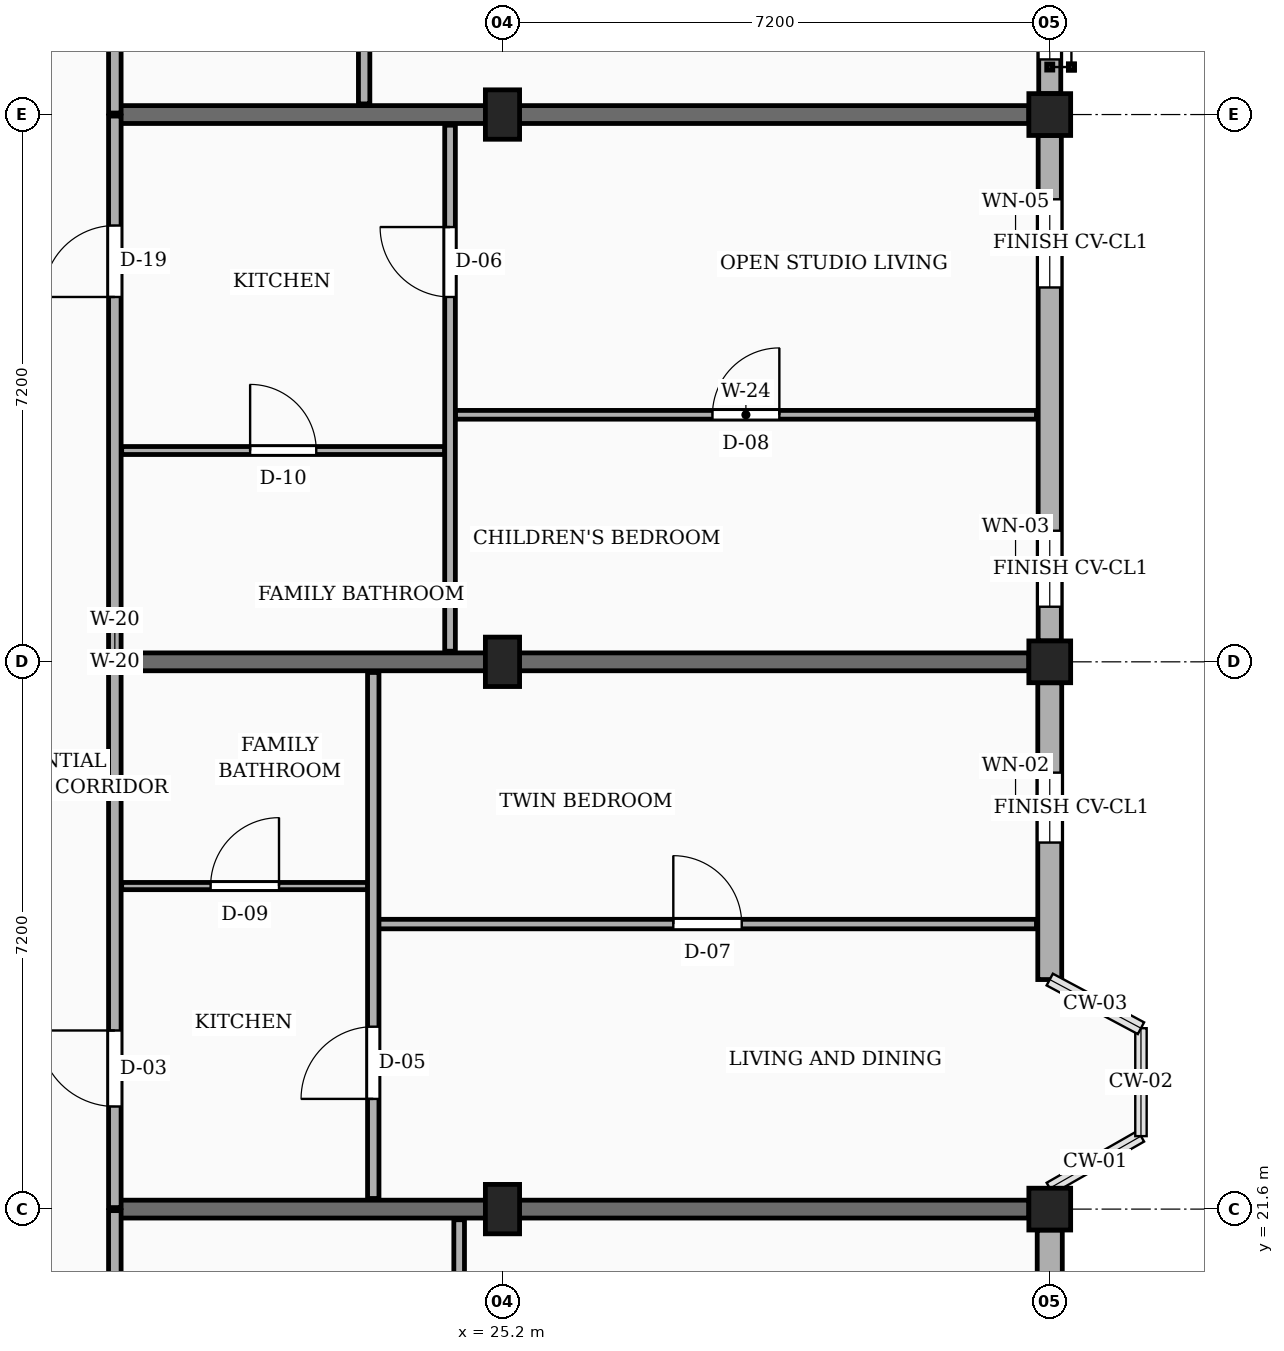
"""IFC4 building model, lengths in metres.
Left out: names, types, materials, properties, quantities, classifications, styles, units other than length and angle.
Written with IfcOpenShell. Run it as: python <this file> out.ifc"""

import sys

from ifc_helpers import new_model, si_unit, direction, frame, frame_2d, origin, origin_2d, place, context, subcontext, project, spatial, rectangle, extrude, element, fill, save


model = new_model("IFC4")
c1 = context("Model", 3, precision=1e-05, world=origin(), true_north=direction((0.0, 1.0)))
c2 = subcontext(c1, "Body", "Model", "MODEL_VIEW")
j1 = project(units=[si_unit("LENGTHUNIT", "METRE"), si_unit("PLANEANGLEUNIT", "RADIAN")], contexts=[c1])
p1 = place(None, origin())
s1 = spatial("IfcSite", under=j1, at=p1, CompositionType="ELEMENT")
p2 = place(p1, origin())
s2 = spatial("IfcBuilding", under=s1, at=p2, CompositionType="ELEMENT")
p3 = place(p2, frame((0.0, 0.0, 20.25)))
s3 = spatial("IfcBuildingStorey", under=s2, at=p3, CompositionType="ELEMENT", Elevation=20.25)
for number, where, z_axis, x_axis in (
    (1, (25.2, 21.6, 0.0), (0.0, 0.0, 1.0), (1.0, 0.0, 0.0)),
    (2, (25.2, 28.8, 0.0), (0.0, 0.0, 1.0), (1.0, 0.0, 0.0)),
    (3, (25.2, 36.0, 0.0), (0.0, 0.0, 1.0), (1.0, 0.0, 0.0)),
):
    element("IfcColumn", number, at=place(p3, frame(where, z_axis=z_axis, x_axis=x_axis)), inside=s3, PredefinedType="COLUMN", context=c2, shape_type="SweptSolid", body=[
        extrude(rectangle(XDim=0.45, YDim=0.65, at=origin_2d()), origin(), (0.0, 0.0, 1.0), 3.15),
    ])
for number, where, z_axis, x_axis in (
    (4, (32.4, 21.6, 0.0), (0.0, 0.0, 1.0), (1.0, 0.0, 0.0)),
    (5, (32.4, 28.8, 0.0), (0.0, 0.0, 1.0), (1.0, 0.0, 0.0)),
    (6, (32.4, 36.0, 0.0), (0.0, 0.0, 1.0), (1.0, 0.0, 0.0)),
):
    element("IfcColumn", number, at=place(p3, frame(where, z_axis=z_axis, x_axis=x_axis)), inside=s3, PredefinedType="COLUMN", context=c2, shape_type="SweptSolid", body=[
        extrude(rectangle(XDim=0.55, YDim=0.55, at=origin_2d()), origin(), (0.0, 0.0, 1.0), 3.15),
    ])
for number, where, z_axis, x_axis in (
    (7, (20.1, 21.6, 0.0), (0.0, 0.0, 1.0), (1.0, 0.0, 0.0)),
    (8, (20.1, 28.8, 0.0), (0.0, 0.0, 1.0), (1.0, 0.0, 0.0)),
    (9, (20.1, 36.0, 0.0), (0.0, 0.0, 1.0), (1.0, 0.0, 0.0)),
):
    element("IfcWall", number, at=place(p3, frame(where, z_axis=z_axis, x_axis=x_axis)), inside=s3, PredefinedType="SOLIDWALL", context=c2, shape_type="SweptSolid", body=[
        extrude(rectangle(XDim=12.025, YDim=0.235, at=frame_2d((6.012, 0.0))), origin(), (0.0, 0.0, 1.0), 2.17),
    ])
p4 = place(p3, frame((32.4, 14.675, 0.0), z_axis=(0.0, 0.0, 1.0), x_axis=(0.0, 1.0, 0.0)))
e10 = element("IfcWall", 10, at=p4, inside=s3, PredefinedType="SOLIDWALL", context=c2, shape_type="SweptSolid", body=[
    extrude(rectangle(XDim=6.65, YDim=0.33, at=frame_2d((3.325, 0.0))), origin(), (0.0, 0.0, 1.0), 2.44),
])
p5 = place(p4, frame((0.45, 0.0, 0.78)))
e11 = element("IfcOpeningElement", 11, at=p5, cuts=e10, PredefinedType="OPENING", context=c2, shape_type="SweptSolid", body=[
    extrude(rectangle(XDim=1.45, YDim=1.44, at=frame_2d((0.725, 0.72))), frame((0.0, 0.175, 0.0), z_axis=(0.0, -1.0, 0.0), x_axis=(1.0, 0.0, 0.0)), (0.0, 0.0, 1.0), 0.35),
])
p6 = place(p4, frame((4.65, 0.0, 0.78)))
e12 = element("IfcOpeningElement", 12, at=p6, cuts=e10, PredefinedType="OPENING", context=c2, shape_type="SweptSolid", body=[
    extrude(rectangle(XDim=0.92, YDim=1.15, at=frame_2d((0.46, 0.575))), frame((0.0, 0.175, 0.0), z_axis=(0.0, -1.0, 0.0), x_axis=(1.0, 0.0, 0.0)), (0.0, 0.0, 1.0), 0.35),
])
p7 = place(p3, frame((32.4, 24.62, 0.0), z_axis=(0.0, 0.0, 1.0), x_axis=(0.0, 1.0, 0.0)))
e13 = element("IfcWall", 13, at=p7, inside=s3, PredefinedType="SOLIDWALL", context=c2, shape_type="SweptSolid", body=[
    extrude(rectangle(XDim=3.905, YDim=0.315, at=frame_2d((1.952, 0.0))), origin(), (0.0, 0.0, 1.0), 2.44),
])
p8 = place(p7, frame((1.802, 0.0, 0.78)))
e14 = element("IfcOpeningElement", 14, at=p8, cuts=e13, PredefinedType="OPENING", context=c2, shape_type="SweptSolid", body=[
    extrude(rectangle(XDim=0.92, YDim=1.15, at=frame_2d((0.46, 0.575))), frame((0.0, 0.167, 0.0), z_axis=(0.0, -1.0, 0.0), x_axis=(1.0, 0.0, 0.0)), (0.0, 0.0, 1.0), 0.335),
])
p9 = place(p3, frame((32.4, 29.075, 0.0), z_axis=(0.0, 0.0, 1.0), x_axis=(0.0, 1.0, 0.0)))
e15 = element("IfcWall", 15, at=p9, inside=s3, PredefinedType="SOLIDWALL", context=c2, shape_type="SweptSolid", body=[
    extrude(rectangle(XDim=6.65, YDim=0.305, at=frame_2d((3.325, 0.0))), origin(), (0.0, 0.0, 1.0), 2.44),
])
p10 = place(p9, frame((0.45, 0.0, 0.78)))
e16 = element("IfcOpeningElement", 16, at=p10, cuts=e15, PredefinedType="OPENING", context=c2, shape_type="SweptSolid", body=[
    extrude(rectangle(XDim=1.0, YDim=1.15, at=frame_2d((0.5, 0.575))), frame((0.0, 0.163, 0.0), z_axis=(0.0, -1.0, 0.0), x_axis=(1.0, 0.0, 0.0)), (0.0, 0.0, 1.0), 0.325),
])
p11 = place(p9, frame((4.65, 0.0, 0.78)))
e17 = element("IfcOpeningElement", 17, at=p11, cuts=e15, PredefinedType="OPENING", context=c2, shape_type="SweptSolid", body=[
    extrude(rectangle(XDim=1.16, YDim=1.15, at=frame_2d((0.58, 0.575))), frame((0.0, 0.163, 0.0), z_axis=(0.0, -1.0, 0.0), x_axis=(1.0, 0.0, 0.0)), (0.0, 0.0, 1.0), 0.325),
])
p12 = place(p3, frame((32.4, 36.275, 0.0), z_axis=(0.0, 0.0, 1.0), x_axis=(0.0, 1.0, 0.0)))
e18 = element("IfcWall", 18, at=p12, inside=s3, PredefinedType="SOLIDWALL", context=c2, shape_type="SweptSolid", body=[
    extrude(rectangle(XDim=6.65, YDim=0.29, at=frame_2d((3.325, 0.0))), origin(), (0.0, 0.0, 1.0), 2.44),
])
p13 = place(p12, frame((0.45, 0.0, 0.78)))
e19 = element("IfcOpeningElement", 19, at=p13, cuts=e18, PredefinedType="OPENING", context=c2, shape_type="SweptSolid", body=[
    extrude(rectangle(XDim=1.16, YDim=1.15, at=frame_2d((0.58, 0.575))), frame((0.0, 0.155, 0.0), z_axis=(0.0, -1.0, 0.0), x_axis=(1.0, 0.0, 0.0)), (0.0, 0.0, 1.0), 0.31),
])
p14 = place(p12, frame((4.65, 0.0, 0.78)))
e20 = element("IfcOpeningElement", 20, at=p14, cuts=e18, PredefinedType="OPENING", context=c2, shape_type="SweptSolid", body=[
    extrude(rectangle(XDim=1.32, YDim=1.15, at=frame_2d((0.66, 0.575))), frame((0.0, 0.155, 0.0), z_axis=(0.0, -1.0, 0.0), x_axis=(1.0, 0.0, 0.0)), (0.0, 0.0, 1.0), 0.31),
])
p15 = place(p3, frame((20.1, 14.42, 0.0), z_axis=(0.0, 0.0, 1.0), x_axis=(0.0, 1.0, 0.0)))
e21 = element("IfcWall", 21, at=p15, inside=s3, PredefinedType="PARTITIONING", context=c2, shape_type="SweptSolid", body=[
    extrude(rectangle(XDim=7.16, YDim=0.165, at=frame_2d((3.58, 0.0))), origin(), (0.0, 0.0, 1.0), 2.305),
])
p16 = place(p15, frame((4.78, 0.0, 0.0)))
e22 = element("IfcOpeningElement", 22, at=p16, cuts=e21, PredefinedType="OPENING", context=c2, shape_type="SweptSolid", body=[
    extrude(rectangle(XDim=1.14, YDim=2.18, at=frame_2d((0.57, 1.09))), frame((0.0, 0.093, 0.0), z_axis=(0.0, -1.0, 0.0), x_axis=(1.0, 0.0, 0.0)), (0.0, 0.0, 1.0), 0.185),
])
p17 = place(p3, frame((20.1, 21.62, 0.0), z_axis=(0.0, 0.0, 1.0), x_axis=(0.0, 1.0, 0.0)))
e23 = element("IfcWall", 23, at=p17, inside=s3, PredefinedType="PARTITIONING", context=c2, shape_type="SweptSolid", body=[
    extrude(rectangle(XDim=7.16, YDim=0.165, at=frame_2d((3.58, 0.0))), origin(), (0.0, 0.0, 1.0), 2.305),
])
p18 = place(p17, frame((1.33, 0.0, 0.0)))
e24 = element("IfcOpeningElement", 24, at=p18, cuts=e23, PredefinedType="OPENING", context=c2, shape_type="SweptSolid", body=[
    extrude(rectangle(XDim=1.0, YDim=2.15, at=frame_2d((0.5, 1.075))), frame((0.0, 0.093, 0.0), z_axis=(0.0, -1.0, 0.0), x_axis=(1.0, 0.0, 0.0)), (0.0, 0.0, 1.0), 0.185),
])
p19 = place(p3, frame((20.1, 28.82, 0.0), z_axis=(0.0, 0.0, 1.0), x_axis=(0.0, 1.0, 0.0)))
e25 = element("IfcWall", 25, at=p19, inside=s3, PredefinedType="PARTITIONING", context=c2, shape_type="SweptSolid", body=[
    extrude(rectangle(XDim=7.16, YDim=0.165, at=frame_2d((3.58, 0.0))), origin(), (0.0, 0.0, 1.0), 2.305),
])
p20 = place(p19, frame((4.78, 0.0, 0.0)))
e26 = element("IfcOpeningElement", 26, at=p20, cuts=e25, PredefinedType="OPENING", context=c2, shape_type="SweptSolid", body=[
    extrude(rectangle(XDim=0.94, YDim=2.12, at=frame_2d((0.47, 1.06))), frame((0.0, 0.093, 0.0), z_axis=(0.0, -1.0, 0.0), x_axis=(1.0, 0.0, 0.0)), (0.0, 0.0, 1.0), 0.185),
])
p21 = place(p3, frame((20.1, 36.02, 0.0), z_axis=(0.0, 0.0, 1.0), x_axis=(0.0, 1.0, 0.0)))
e27 = element("IfcWall", 27, at=p21, inside=s3, PredefinedType="PARTITIONING", context=c2, shape_type="SweptSolid", body=[
    extrude(rectangle(XDim=7.16, YDim=0.165, at=frame_2d((3.58, 0.0))), origin(), (0.0, 0.0, 1.0), 2.305),
])
p22 = place(p21, frame((1.33, 0.0, 0.0)))
e28 = element("IfcOpeningElement", 28, at=p22, cuts=e27, PredefinedType="OPENING", context=c2, shape_type="SweptSolid", body=[
    extrude(rectangle(XDim=1.14, YDim=2.18, at=frame_2d((0.57, 1.09))), frame((0.0, 0.093, 0.0), z_axis=(0.0, -1.0, 0.0), x_axis=(1.0, 0.0, 0.0)), (0.0, 0.0, 1.0), 0.185),
])
p23 = place(p3, frame((24.63, 14.54, 0.0), z_axis=(0.0, 0.0, 1.0), x_axis=(0.0, 1.0, 0.0)))
e29 = element("IfcWall", 29, at=p23, inside=s3, PredefinedType="PARTITIONING", context=c2, shape_type="SweptSolid", body=[
    extrude(rectangle(XDim=6.92, YDim=0.14, at=frame_2d((3.46, 0.0))), origin(), (0.0, 0.0, 1.0), 2.305),
])
p24 = place(p23, frame((4.66, 0.0, 0.0)))
e30 = element("IfcOpeningElement", 30, at=p24, cuts=e29, PredefinedType="OPENING", context=c2, shape_type="SweptSolid", body=[
    extrude(rectangle(XDim=0.92, YDim=2.1, at=frame_2d((0.46, 1.05))), frame((0.0, 0.08, 0.0), z_axis=(0.0, -1.0, 0.0), x_axis=(1.0, 0.0, 0.0)), (0.0, 0.0, 1.0), 0.16),
])
p25 = place(p3, frame((23.57, 25.35, 0.0), z_axis=(0.0, 0.0, 1.0), x_axis=(1.0, 0.0, 0.0)))
e31 = element("IfcWall", 31, at=p25, inside=s3, PredefinedType="PARTITIONING", context=c2, shape_type="SweptSolid", body=[
    extrude(rectangle(XDim=8.655, YDim=0.125, at=frame_2d((4.328, 0.0))), origin(), (0.0, 0.0, 1.0), 2.305),
])
p26 = place(p25, frame((3.877, 0.0, 0.0)))
e32 = element("IfcOpeningElement", 32, at=p26, cuts=e31, PredefinedType="OPENING", context=c2, shape_type="SweptSolid", body=[
    extrude(rectangle(XDim=0.9, YDim=2.1, at=frame_2d((0.45, 1.05))), frame((0.0, 0.073, 0.0), z_axis=(0.0, -1.0, 0.0), x_axis=(1.0, 0.0, 0.0)), (0.0, 0.0, 1.0), 0.145),
])
p27 = place(p3, frame((20.19, 25.85, 0.0), z_axis=(0.0, 0.0, 1.0), x_axis=(1.0, 0.0, 0.0)))
e33 = element("IfcWall", 33, at=p27, inside=s3, PredefinedType="PARTITIONING", context=c2, shape_type="SweptSolid", body=[
    extrude(rectangle(XDim=3.24, YDim=0.095, at=frame_2d((1.62, 0.0))), origin(), (0.0, 0.0, 1.0), 2.305),
])
p28 = place(p27, frame((1.17, 0.0, 0.0)))
e34 = element("IfcOpeningElement", 34, at=p28, cuts=e33, PredefinedType="OPENING", context=c2, shape_type="SweptSolid", body=[
    extrude(rectangle(XDim=0.9, YDim=2.05, at=frame_2d((0.45, 1.025))), frame((0.0, 0.058, 0.0), z_axis=(0.0, -1.0, 0.0), x_axis=(1.0, 0.0, 0.0)), (0.0, 0.0, 1.0), 0.115),
])
p29 = place(p3, frame((23.5, 21.74, 0.0), z_axis=(0.0, 0.0, 1.0), x_axis=(0.0, 1.0, 0.0)))
e35 = element("IfcWall", 35, at=p29, inside=s3, PredefinedType="PARTITIONING", context=c2, shape_type="SweptSolid", body=[
    extrude(rectangle(XDim=6.92, YDim=0.15, at=frame_2d((3.46, 0.0))), origin(), (0.0, 0.0, 1.0), 2.305),
])
p30 = place(p29, frame((1.31, 0.0, 0.0)))
e36 = element("IfcOpeningElement", 36, at=p30, cuts=e35, PredefinedType="OPENING", context=c2, shape_type="SweptSolid", body=[
    extrude(rectangle(XDim=0.95, YDim=2.1, at=frame_2d((0.475, 1.05))), frame((0.0, 0.085, 0.0), z_axis=(0.0, -1.0, 0.0), x_axis=(1.0, 0.0, 0.0)), (0.0, 0.0, 1.0), 0.17),
])
p31 = place(p3, frame((24.58, 32.05, 0.0), z_axis=(0.0, 0.0, 1.0), x_axis=(1.0, 0.0, 0.0)))
e37 = element("IfcWall", 37, at=p31, inside=s3, PredefinedType="PARTITIONING", context=c2, shape_type="SweptSolid", body=[
    extrude(rectangle(XDim=7.645, YDim=0.115, at=frame_2d((3.823, 0.0))), origin(), (0.0, 0.0, 1.0), 2.305),
])
p32 = place(p31, frame((3.383, 0.0, 0.0)))
e38 = element("IfcOpeningElement", 38, at=p32, cuts=e37, PredefinedType="OPENING", context=c2, shape_type="SweptSolid", body=[
    extrude(rectangle(XDim=0.88, YDim=2.08, at=frame_2d((0.44, 1.04))), frame((0.0, 0.067, 0.0), z_axis=(0.0, -1.0, 0.0), x_axis=(1.0, 0.0, 0.0)), (0.0, 0.0, 1.0), 0.135),
])
p33 = place(p3, frame((20.19, 31.58, 0.0), z_axis=(0.0, 0.0, 1.0), x_axis=(1.0, 0.0, 0.0)))
e39 = element("IfcWall", 39, at=p33, inside=s3, PredefinedType="PARTITIONING", context=c2, shape_type="SweptSolid", body=[
    extrude(rectangle(XDim=4.25, YDim=0.105, at=frame_2d((2.125, 0.0))), origin(), (0.0, 0.0, 1.0), 2.305),
])
p34 = place(p33, frame((1.69, 0.0, 0.0)))
e40 = element("IfcOpeningElement", 40, at=p34, cuts=e39, PredefinedType="OPENING", context=c2, shape_type="SweptSolid", body=[
    extrude(rectangle(XDim=0.87, YDim=2.05, at=frame_2d((0.435, 1.025))), frame((0.0, 0.062, 0.0), z_axis=(0.0, -1.0, 0.0), x_axis=(1.0, 0.0, 0.0)), (0.0, 0.0, 1.0), 0.125),
])
p35 = place(p3, frame((24.51, 28.94, 0.0), z_axis=(0.0, 0.0, 1.0), x_axis=(0.0, 1.0, 0.0)))
e41 = element("IfcWall", 41, at=p35, inside=s3, PredefinedType="PARTITIONING", context=c2, shape_type="SweptSolid", body=[
    extrude(rectangle(XDim=6.92, YDim=0.14, at=frame_2d((3.46, 0.0))), origin(), (0.0, 0.0, 1.0), 2.305),
])
p36 = place(p35, frame((4.66, 0.0, 0.0)))
e42 = element("IfcOpeningElement", 42, at=p36, cuts=e41, PredefinedType="OPENING", context=c2, shape_type="SweptSolid", body=[
    extrude(rectangle(XDim=0.92, YDim=2.1, at=frame_2d((0.46, 1.05))), frame((0.0, 0.08, 0.0), z_axis=(0.0, -1.0, 0.0), x_axis=(1.0, 0.0, 0.0)), (0.0, 0.0, 1.0), 0.16),
])
p37 = place(p3, frame((23.38, 36.14, 0.0), z_axis=(0.0, 0.0, 1.0), x_axis=(0.0, 1.0, 0.0)))
e43 = element("IfcWall", 43, at=p37, inside=s3, PredefinedType="PARTITIONING", context=c2, shape_type="SweptSolid", body=[
    extrude(rectangle(XDim=6.92, YDim=0.15, at=frame_2d((3.46, 0.0))), origin(), (0.0, 0.0, 1.0), 2.305),
])
p38 = place(p37, frame((1.31, 0.0, 0.0)))
e44 = element("IfcOpeningElement", 44, at=p38, cuts=e43, PredefinedType="OPENING", context=c2, shape_type="SweptSolid", body=[
    extrude(rectangle(XDim=0.95, YDim=2.1, at=frame_2d((0.475, 1.05))), frame((0.0, 0.085, 0.0), z_axis=(0.0, -1.0, 0.0), x_axis=(1.0, 0.0, 0.0)), (0.0, 0.0, 1.0), 0.17),
])
p39 = place(p8, origin())
e45 = element("IfcWindow", 45, at=p39, inside=s3, PartitioningType="SINGLE_PANEL", PredefinedType="WINDOW", context=c2, shape_type="SweptSolid", body=[
    extrude(rectangle(XDim=0.92, YDim=1.15, at=frame_2d((0.46, 0.575))), frame((0.0, 0.03, 0.0), z_axis=(0.0, -1.0, 0.0), x_axis=(1.0, 0.0, 0.0)), (0.0, 0.0, 1.0), 0.06),
])
fill(e14, e45)
p40 = place(p10, origin())
e46 = element("IfcWindow", 46, at=p40, inside=s3, PartitioningType="SINGLE_PANEL", PredefinedType="WINDOW", context=c2, shape_type="SweptSolid", body=[
    extrude(rectangle(XDim=1.0, YDim=1.15, at=frame_2d((0.5, 0.575))), frame((0.0, 0.03, 0.0), z_axis=(0.0, -1.0, 0.0), x_axis=(1.0, 0.0, 0.0)), (0.0, 0.0, 1.0), 0.06),
])
fill(e16, e46)
p41 = place(p11, origin())
e47 = element("IfcWindow", 47, at=p41, inside=s3, PartitioningType="SINGLE_PANEL", PredefinedType="WINDOW", context=c2, shape_type="SweptSolid", body=[
    extrude(rectangle(XDim=1.16, YDim=1.15, at=frame_2d((0.58, 0.575))), frame((0.0, 0.03, 0.0), z_axis=(0.0, -1.0, 0.0), x_axis=(1.0, 0.0, 0.0)), (0.0, 0.0, 1.0), 0.06),
])
fill(e17, e47)
p42 = place(p13, origin())
e48 = element("IfcWindow", 48, at=p42, inside=s3, PartitioningType="SINGLE_PANEL", PredefinedType="WINDOW", context=c2, shape_type="SweptSolid", body=[
    extrude(rectangle(XDim=1.16, YDim=1.15, at=frame_2d((0.58, 0.575))), frame((0.0, 0.03, 0.0), z_axis=(0.0, -1.0, 0.0), x_axis=(1.0, 0.0, 0.0)), (0.0, 0.0, 1.0), 0.06),
])
fill(e19, e48)
p43 = place(p18, origin())
e49 = element("IfcDoor", 49, at=p43, inside=s3, OperationType="SINGLE_SWING_RIGHT", PredefinedType="DOOR", context=c2, shape_type="SweptSolid", body=[
    extrude(rectangle(XDim=1.0, YDim=2.15, at=frame_2d((0.5, 1.075))), frame((0.0, 0.025, 0.0), z_axis=(0.0, -1.0, 0.0), x_axis=(1.0, 0.0, 0.0)), (0.0, 0.0, 1.0), 0.05),
])
fill(e24, e49)
p44 = place(p20, origin())
e50 = element("IfcDoor", 50, at=p44, inside=s3, OperationType="SINGLE_SWING_LEFT", PredefinedType="DOOR", context=c2, shape_type="SweptSolid", body=[
    extrude(rectangle(XDim=0.94, YDim=2.12, at=frame_2d((0.47, 1.06))), frame((0.0, 0.025, 0.0), z_axis=(0.0, -1.0, 0.0), x_axis=(1.0, 0.0, 0.0)), (0.0, 0.0, 1.0), 0.05),
])
fill(e26, e50)
p45 = place(p26, origin())
e51 = element("IfcDoor", 51, at=p45, inside=s3, OperationType="SINGLE_SWING_LEFT", PredefinedType="DOOR", context=c2, shape_type="SweptSolid", body=[
    extrude(rectangle(XDim=0.9, YDim=2.1, at=frame_2d((0.45, 1.05))), frame((0.0, 0.025, 0.0), z_axis=(0.0, -1.0, 0.0), x_axis=(1.0, 0.0, 0.0)), (0.0, 0.0, 1.0), 0.05),
])
fill(e32, e51)
p46 = place(p28, origin())
e52 = element("IfcDoor", 52, at=p46, inside=s3, OperationType="SINGLE_SWING_RIGHT", PredefinedType="DOOR", context=c2, shape_type="SweptSolid", body=[
    extrude(rectangle(XDim=0.9, YDim=2.05, at=frame_2d((0.45, 1.025))), frame((0.0, 0.025, 0.0), z_axis=(0.0, -1.0, 0.0), x_axis=(1.0, 0.0, 0.0)), (0.0, 0.0, 1.0), 0.05),
])
fill(e34, e52)
p47 = place(p30, origin())
e53 = element("IfcDoor", 53, at=p47, inside=s3, OperationType="SINGLE_SWING_LEFT", PredefinedType="DOOR", context=c2, shape_type="SweptSolid", body=[
    extrude(rectangle(XDim=0.95, YDim=2.1, at=frame_2d((0.475, 1.05))), frame((0.0, 0.025, 0.0), z_axis=(0.0, -1.0, 0.0), x_axis=(1.0, 0.0, 0.0)), (0.0, 0.0, 1.0), 0.05),
])
fill(e36, e53)
p48 = place(p32, origin())
e54 = element("IfcDoor", 54, at=p48, inside=s3, OperationType="SINGLE_SWING_RIGHT", PredefinedType="DOOR", context=c2, shape_type="SweptSolid", body=[
    extrude(rectangle(XDim=0.88, YDim=2.08, at=frame_2d((0.44, 1.04))), frame((0.0, 0.025, 0.0), z_axis=(0.0, -1.0, 0.0), x_axis=(1.0, 0.0, 0.0)), (0.0, 0.0, 1.0), 0.05),
])
fill(e38, e54)
p49 = place(p34, origin())
e55 = element("IfcDoor", 55, at=p49, inside=s3, OperationType="SINGLE_SWING_LEFT", PredefinedType="DOOR", context=c2, shape_type="SweptSolid", body=[
    extrude(rectangle(XDim=0.87, YDim=2.05, at=frame_2d((0.435, 1.025))), frame((0.0, 0.025, 0.0), z_axis=(0.0, -1.0, 0.0), x_axis=(1.0, 0.0, 0.0)), (0.0, 0.0, 1.0), 0.05),
])
fill(e40, e55)
p50 = place(p36, origin())
e56 = element("IfcDoor", 56, at=p50, inside=s3, OperationType="SINGLE_SWING_RIGHT", PredefinedType="DOOR", context=c2, shape_type="SweptSolid", body=[
    extrude(rectangle(XDim=0.92, YDim=2.1, at=frame_2d((0.46, 1.05))), frame((0.0, 0.025, 0.0), z_axis=(0.0, -1.0, 0.0), x_axis=(1.0, 0.0, 0.0)), (0.0, 0.0, 1.0), 0.05),
])
fill(e42, e56)
save(model, sys.argv[1])
